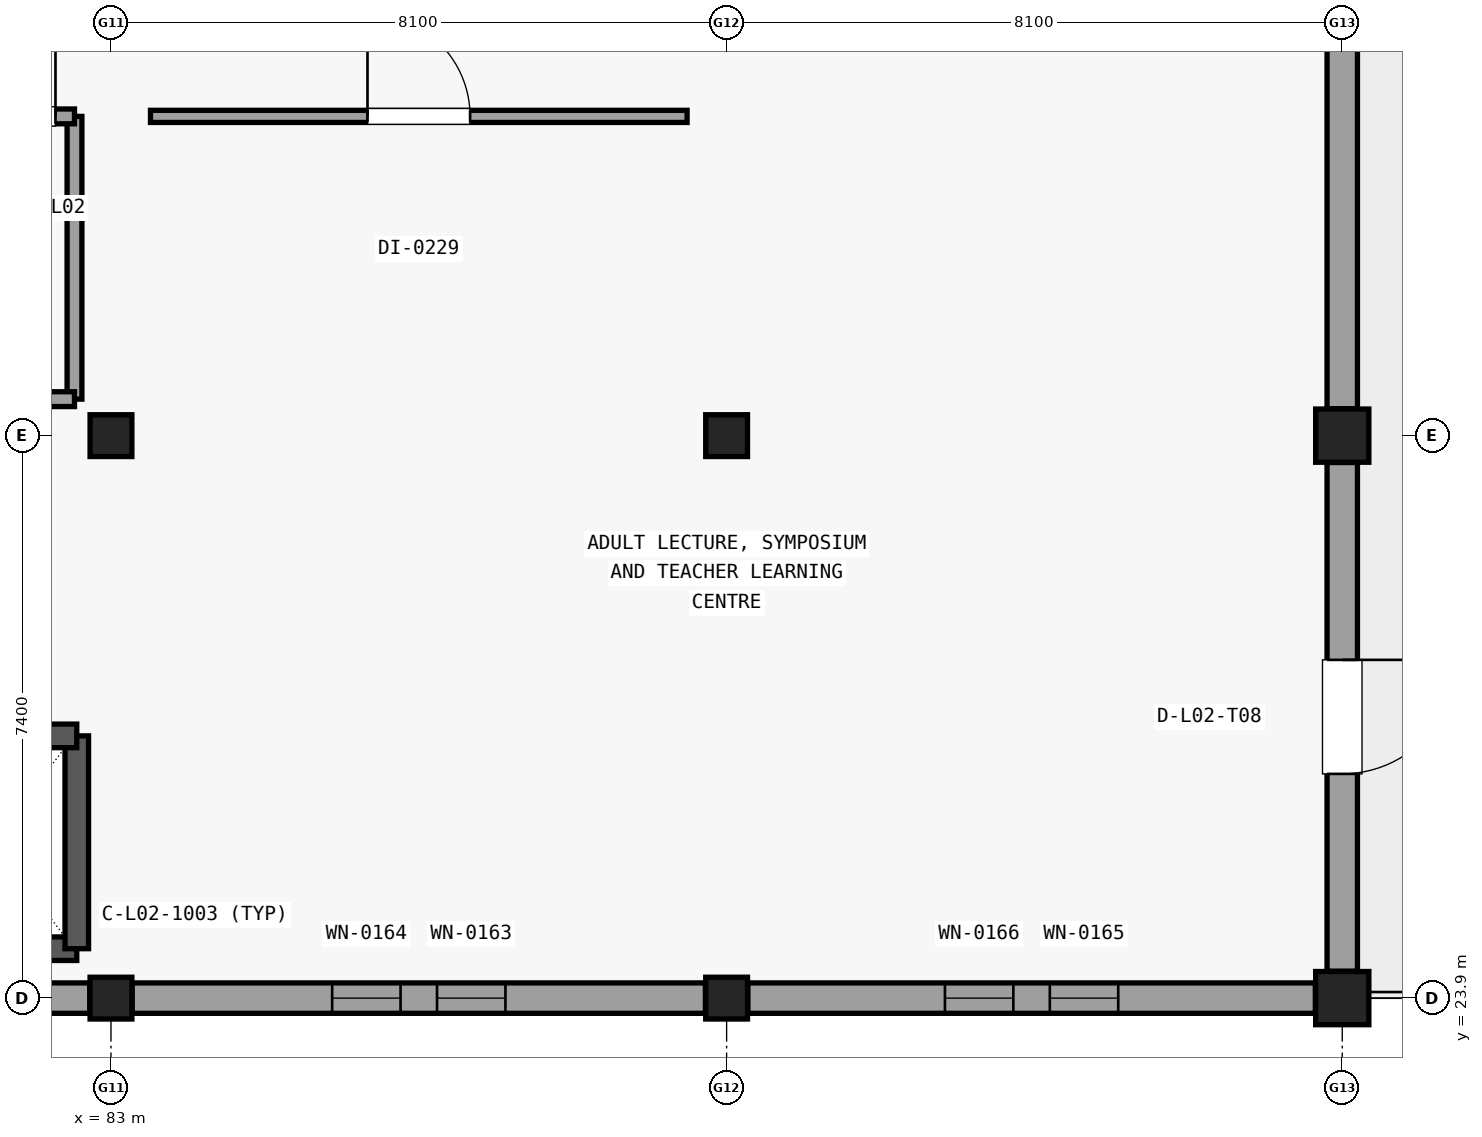
"""IFC4 building model, lengths in metres.
Left out: names, types, materials, properties, quantities, classifications, styles, units other than length and angle.
Written with IfcOpenShell. Run it as: python <this file> out.ifc"""

import sys

from ifc_helpers import new_model, si_unit, direction, frame, frame_2d, origin, origin_2d, place, context, subcontext, project, spatial, rectangle, extrude, element, fill, save


model = new_model("IFC4")
c1 = context("Model", 3, precision=1e-05, world=origin(), true_north=direction((0.0, 1.0)))
c2 = subcontext(c1, "Body", "Model", "MODEL_VIEW")
j1 = project(units=[si_unit("LENGTHUNIT", "METRE"), si_unit("PLANEANGLEUNIT", "RADIAN")], contexts=[c1])
p1 = place(None, origin())
s1 = spatial("IfcSite", under=j1, at=p1, CompositionType="ELEMENT")
p2 = place(p1, origin())
s2 = spatial("IfcBuilding", under=s1, at=p2, CompositionType="ELEMENT")
p3 = place(p2, frame((0.0, 0.0, 10.2)))
s3 = spatial("IfcBuildingStorey", under=s2, at=p3, CompositionType="ELEMENT", Elevation=10.2)
for number, where, z_axis, x_axis in (
    (1, (83.0, 23.9, 0.0), (0.0, 0.0, 1.0), (1.0, 0.0, 0.0)),
    (2, (83.0, 31.3, 0.0), (0.0, 0.0, 1.0), (1.0, 0.0, 0.0)),
    (3, (91.1, 23.9, 0.0), (0.0, 0.0, 1.0), (1.0, 0.0, 0.0)),
    (4, (91.1, 31.3, 0.0), (0.0, 0.0, 1.0), (1.0, 0.0, 0.0)),
):
    element("IfcColumn", number, at=place(p3, frame(where, z_axis=z_axis, x_axis=x_axis)), inside=s3, PredefinedType="COLUMN", context=c2, shape_type="SweptSolid", body=[
        extrude(rectangle(XDim=0.55, YDim=0.55, at=origin_2d()), origin(), (0.0, 0.0, 1.0), 3.37),
    ])
for number, where, z_axis, x_axis in (
    (5, (99.2, 23.9, 0.0), (0.0, 0.0, 1.0), (1.0, 0.0, 0.0)),
    (6, (99.2, 31.3, 0.0), (0.0, 0.0, 1.0), (1.0, 0.0, 0.0)),
):
    element("IfcColumn", number, at=place(p3, frame(where, z_axis=z_axis, x_axis=x_axis)), inside=s3, PredefinedType="COLUMN", context=c2, shape_type="SweptSolid", body=[
        extrude(rectangle(XDim=0.7, YDim=0.7, at=origin_2d()), origin(), (0.0, 0.0, 1.0), 3.37),
    ])
p4 = place(p3, frame((82.721, 23.9, 0.0), z_axis=(0.0, 0.0, 1.0), x_axis=(-1.0, 0.0, 0.0)))
e7 = element("IfcWall", 7, at=p4, inside=s3, PredefinedType="SOLIDWALL", context=c2, shape_type="SweptSolid", body=[
    extrude(rectangle(XDim=7.467, YDim=0.4, at=frame_2d((3.733, 0.0))), origin(), (0.0, 0.0, 1.0), 2.822),
])
p5 = place(p4, frame((2.594, 0.0, 0.6)))
e8 = element("IfcOpeningElement", 8, at=p5, cuts=e7, PredefinedType="OPENING", context=c2, shape_type="SweptSolid", body=[
    extrude(rectangle(XDim=0.9, YDim=1.98, at=frame_2d((0.45, 0.99))), frame((0.0, 0.21, 0.0), z_axis=(0.0, -1.0, 0.0), x_axis=(1.0, 0.0, 0.0)), (0.0, 0.0, 1.0), 0.42),
])
p6 = place(p4, frame((3.973, 0.0, 0.6)))
e9 = element("IfcOpeningElement", 9, at=p6, cuts=e7, PredefinedType="OPENING", context=c2, shape_type="SweptSolid", body=[
    extrude(rectangle(XDim=0.9, YDim=1.98, at=frame_2d((0.45, 0.99))), frame((0.0, 0.21, 0.0), z_axis=(0.0, -1.0, 0.0), x_axis=(1.0, 0.0, 0.0)), (0.0, 0.0, 1.0), 0.42),
])
p7 = place(p3, frame((90.821, 23.9, 0.0), z_axis=(0.0, 0.0, 1.0), x_axis=(-1.0, 0.0, 0.0)))
e10 = element("IfcWall", 10, at=p7, inside=s3, PredefinedType="SOLIDWALL", context=c2, shape_type="SweptSolid", body=[
    extrude(rectangle(XDim=7.542, YDim=0.4, at=frame_2d((3.771, 0.0))), origin(), (0.0, 0.0, 1.0), 2.898),
])
p8 = place(p7, frame((2.631, 0.0, 0.6)))
e11 = element("IfcOpeningElement", 11, at=p8, cuts=e10, PredefinedType="OPENING", context=c2, shape_type="SweptSolid", body=[
    extrude(rectangle(XDim=0.9, YDim=1.98, at=frame_2d((0.45, 0.99))), frame((0.0, 0.21, 0.0), z_axis=(0.0, -1.0, 0.0), x_axis=(1.0, 0.0, 0.0)), (0.0, 0.0, 1.0), 0.42),
])
p9 = place(p7, frame((4.011, 0.0, 0.6)))
e12 = element("IfcOpeningElement", 12, at=p9, cuts=e10, PredefinedType="OPENING", context=c2, shape_type="SweptSolid", body=[
    extrude(rectangle(XDim=0.9, YDim=1.98, at=frame_2d((0.45, 0.99))), frame((0.0, 0.21, 0.0), z_axis=(0.0, -1.0, 0.0), x_axis=(1.0, 0.0, 0.0)), (0.0, 0.0, 1.0), 0.42),
])
p10 = place(p3, frame((98.846, 23.9, 0.0), z_axis=(0.0, 0.0, 1.0), x_axis=(-1.0, 0.0, 0.0)))
e13 = element("IfcWall", 13, at=p10, inside=s3, PredefinedType="SOLIDWALL", context=c2, shape_type="SweptSolid", body=[
    extrude(rectangle(XDim=7.467, YDim=0.4, at=frame_2d((3.733, 0.0))), origin(), (0.0, 0.0, 1.0), 2.822),
])
p11 = place(p10, frame((2.594, 0.0, 0.6)))
e14 = element("IfcOpeningElement", 14, at=p11, cuts=e13, PredefinedType="OPENING", context=c2, shape_type="SweptSolid", body=[
    extrude(rectangle(XDim=0.9, YDim=1.98, at=frame_2d((0.45, 0.99))), frame((0.0, 0.21, 0.0), z_axis=(0.0, -1.0, 0.0), x_axis=(1.0, 0.0, 0.0)), (0.0, 0.0, 1.0), 0.42),
])
p12 = place(p10, frame((3.973, 0.0, 0.6)))
e15 = element("IfcOpeningElement", 15, at=p12, cuts=e13, PredefinedType="OPENING", context=c2, shape_type="SweptSolid", body=[
    extrude(rectangle(XDim=0.9, YDim=1.98, at=frame_2d((0.45, 0.99))), frame((0.0, 0.21, 0.0), z_axis=(0.0, -1.0, 0.0), x_axis=(1.0, 0.0, 0.0)), (0.0, 0.0, 1.0), 0.42),
])
p13 = place(p3, frame((99.2, 30.946, 0.0), z_axis=(0.0, 0.0, 1.0), x_axis=(0.0, -1.0, 0.0)))
e16 = element("IfcWall", 16, at=p13, inside=s3, PredefinedType="SOLIDWALL", context=c2, shape_type="SweptSolid", body=[
    extrude(rectangle(XDim=6.692, YDim=0.4, at=frame_2d((3.346, 0.0))), origin(), (0.0, 0.0, 1.0), 2.822),
])
p14 = place(p13, frame((2.596, 0.0, 0.0)))
e17 = element("IfcOpeningElement", 17, at=p14, cuts=e16, PredefinedType="OPENING", context=c2, shape_type="SweptSolid", body=[
    extrude(rectangle(XDim=1.5, YDim=2.1, at=frame_2d((0.75, 1.05))), frame((0.0, 0.21, 0.0), z_axis=(0.0, -1.0, 0.0), x_axis=(1.0, 0.0, 0.0)), (0.0, 0.0, 1.0), 0.42),
])
p15 = place(p3, frame((99.2, 38.346, 0.0), z_axis=(0.0, 0.0, 1.0), x_axis=(0.0, -1.0, 0.0)))
e18 = element("IfcWall", 18, at=p15, inside=s3, PredefinedType="SOLIDWALL", context=c2, shape_type="SweptSolid", body=[
    extrude(rectangle(XDim=6.692, YDim=0.4, at=frame_2d((3.346, 0.0))), origin(), (0.0, 0.0, 1.0), 2.509),
])
p16 = place(p3, frame((80.35, 24.55, 0.0), z_axis=(0.0, 0.0, 1.0), x_axis=(1.0, 0.0, 0.0)))
e19 = element("IfcWall", 19, at=p16, inside=s3, PredefinedType="SHEAR", context=c2, shape_type="SweptSolid", body=[
    extrude(rectangle(XDim=2.2, YDim=0.31, at=frame_2d((1.1, 0.0))), origin(), (0.0, 0.0, 1.0), 3.365),
])
p17 = place(p3, frame((82.55, 24.55, 0.0), z_axis=(0.0, 0.0, 1.0), x_axis=(0.0, 1.0, 0.0)))
e20 = element("IfcWall", 20, at=p17, inside=s3, PredefinedType="SHEAR", context=c2, shape_type="SweptSolid", body=[
    extrude(rectangle(XDim=2.8, YDim=0.31, at=frame_2d((1.4, 0.0))), origin(), (0.0, 0.0, 1.0), 3.365),
])
p18 = place(p3, frame((80.35, 27.35, 0.0), z_axis=(0.0, 0.0, 1.0), x_axis=(1.0, 0.0, 0.0)))
e21 = element("IfcWall", 21, at=p18, inside=s3, PredefinedType="SHEAR", context=c2, shape_type="SweptSolid", body=[
    extrude(rectangle(XDim=2.2, YDim=0.31, at=frame_2d((1.1, 0.0))), origin(), (0.0, 0.0, 1.0), 3.365),
])
p19 = place(p18, frame((0.5, 0.0, 0.0)))
e22 = element("IfcOpeningElement", 22, at=p19, cuts=e21, PredefinedType="OPENING", context=c2, shape_type="SweptSolid", body=[
    extrude(rectangle(XDim=1.2, YDim=2.15, at=frame_2d((0.6, 1.075))), frame((0.0, 0.165, 0.0), z_axis=(0.0, -1.0, 0.0), x_axis=(1.0, 0.0, 0.0)), (0.0, 0.0, 1.0), 0.33),
])
p20 = place(p3, frame((82.52, 31.78, 0.0), z_axis=(0.0, 0.0, 1.0), x_axis=(0.0, 1.0, 0.0)))
e23 = element("IfcWall", 23, at=p20, inside=s3, PredefinedType="PARTITIONING", context=c2, shape_type="SweptSolid", body=[
    extrude(rectangle(XDim=3.72, YDim=0.195, at=frame_2d((1.86, 0.0))), origin(), (0.0, 0.0, 1.0), 2.903),
])
p21 = place(p3, frame((79.55, 31.78, 0.0), z_axis=(0.0, 0.0, 1.0), x_axis=(1.0, 0.0, 0.0)))
e24 = element("IfcWall", 24, at=p21, inside=s3, PredefinedType="PARTITIONING", context=c2, shape_type="SweptSolid", body=[
    extrude(rectangle(XDim=2.97, YDim=0.195, at=frame_2d((1.485, 0.0))), origin(), (0.0, 0.0, 1.0), 2.903),
])
p22 = place(p3, frame((79.55, 35.5, 0.0), z_axis=(0.0, 0.0, 1.0), x_axis=(1.0, 0.0, 0.0)))
e25 = element("IfcWall", 25, at=p22, inside=s3, PredefinedType="PARTITIONING", context=c2, shape_type="SweptSolid", body=[
    extrude(rectangle(XDim=2.97, YDim=0.195, at=frame_2d((1.485, 0.0))), origin(), (0.0, 0.0, 1.0), 3.355),
])
p23 = place(p22, frame((0.25, 0.0, 0.0)))
e26 = element("IfcOpeningElement", 26, at=p23, cuts=e25, PredefinedType="OPENING", context=c2, shape_type="SweptSolid", body=[
    extrude(rectangle(XDim=0.95, YDim=2.1, at=frame_2d((0.475, 1.05))), frame((0.0, 0.107, 0.0), z_axis=(0.0, -1.0, 0.0), x_axis=(1.0, 0.0, 0.0)), (0.0, 0.0, 1.0), 0.215),
])
p24 = place(p22, frame((1.82, 0.0, 0.0)))
e27 = element("IfcOpeningElement", 27, at=p24, cuts=e25, PredefinedType="OPENING", context=c2, shape_type="SweptSolid", body=[
    extrude(rectangle(XDim=0.9, YDim=2.1, at=frame_2d((0.45, 1.05))), frame((0.0, 0.107, 0.0), z_axis=(0.0, -1.0, 0.0), x_axis=(1.0, 0.0, 0.0)), (0.0, 0.0, 1.0), 0.215),
])
p25 = place(p3, frame((83.52, 35.5, 0.0), z_axis=(0.0, 0.0, 1.0), x_axis=(1.0, 0.0, 0.0)))
e28 = element("IfcWall", 28, at=p25, inside=s3, PredefinedType="PARTITIONING", context=c2, shape_type="SweptSolid", body=[
    extrude(rectangle(XDim=7.06, YDim=0.16, at=frame_2d((3.53, 0.0))), origin(), (0.0, 0.0, 1.0), 3.355),
])
p26 = place(p25, frame((2.855, 0.0, 0.0)))
e29 = element("IfcOpeningElement", 29, at=p26, cuts=e28, PredefinedType="OPENING", context=c2, shape_type="SweptSolid", body=[
    extrude(rectangle(XDim=1.35, YDim=2.2, at=frame_2d((0.675, 1.1))), frame((0.0, 0.09, 0.0), z_axis=(0.0, -1.0, 0.0), x_axis=(1.0, 0.0, 0.0)), (0.0, 0.0, 1.0), 0.18),
])
p27 = place(p8, origin())
e30 = element("IfcWindow", 30, at=p27, inside=s3, PartitioningType="SINGLE_PANEL", PredefinedType="WINDOW", context=c2, shape_type="SweptSolid", body=[
    extrude(rectangle(XDim=0.9, YDim=1.98, at=frame_2d((0.45, 0.99))), frame((0.0, 0.03, 0.0), z_axis=(0.0, -1.0, 0.0), x_axis=(1.0, 0.0, 0.0)), (0.0, 0.0, 1.0), 0.06),
])
fill(e11, e30)
p28 = place(p9, origin())
e31 = element("IfcWindow", 31, at=p28, inside=s3, PartitioningType="SINGLE_PANEL", PredefinedType="WINDOW", context=c2, shape_type="SweptSolid", body=[
    extrude(rectangle(XDim=0.9, YDim=1.98, at=frame_2d((0.45, 0.99))), frame((0.0, 0.03, 0.0), z_axis=(0.0, -1.0, 0.0), x_axis=(1.0, 0.0, 0.0)), (0.0, 0.0, 1.0), 0.06),
])
fill(e12, e31)
p29 = place(p11, origin())
e32 = element("IfcWindow", 32, at=p29, inside=s3, PartitioningType="SINGLE_PANEL", PredefinedType="WINDOW", context=c2, shape_type="SweptSolid", body=[
    extrude(rectangle(XDim=0.9, YDim=1.98, at=frame_2d((0.45, 0.99))), frame((0.0, 0.03, 0.0), z_axis=(0.0, -1.0, 0.0), x_axis=(1.0, 0.0, 0.0)), (0.0, 0.0, 1.0), 0.06),
])
fill(e14, e32)
p30 = place(p12, origin())
e33 = element("IfcWindow", 33, at=p30, inside=s3, PartitioningType="SINGLE_PANEL", PredefinedType="WINDOW", context=c2, shape_type="SweptSolid", body=[
    extrude(rectangle(XDim=0.9, YDim=1.98, at=frame_2d((0.45, 0.99))), frame((0.0, 0.03, 0.0), z_axis=(0.0, -1.0, 0.0), x_axis=(1.0, 0.0, 0.0)), (0.0, 0.0, 1.0), 0.06),
])
fill(e15, e33)
p31 = place(p14, origin())
e34 = element("IfcDoor", 34, at=p31, inside=s3, OperationType="SINGLE_SWING_LEFT", PredefinedType="DOOR", context=c2, shape_type="SweptSolid", body=[
    extrude(rectangle(XDim=1.5, YDim=2.1, at=frame_2d((0.75, 1.05))), frame((0.0, 0.025, 0.0), z_axis=(0.0, -1.0, 0.0), x_axis=(1.0, 0.0, 0.0)), (0.0, 0.0, 1.0), 0.05),
])
fill(e17, e34)
p32 = place(p24, origin())
e35 = element("IfcDoor", 35, at=p32, inside=s3, OperationType="SINGLE_SWING_RIGHT", PredefinedType="DOOR", context=c2, shape_type="SweptSolid", body=[
    extrude(rectangle(XDim=0.9, YDim=2.1, at=frame_2d((0.45, 1.05))), frame((0.0, 0.025, 0.0), z_axis=(0.0, -1.0, 0.0), x_axis=(1.0, 0.0, 0.0)), (0.0, 0.0, 1.0), 0.05),
])
fill(e27, e35)
p33 = place(p26, origin())
e36 = element("IfcDoor", 36, at=p33, inside=s3, OperationType="SINGLE_SWING_LEFT", PredefinedType="DOOR", context=c2, shape_type="SweptSolid", body=[
    extrude(rectangle(XDim=1.35, YDim=2.2, at=frame_2d((0.675, 1.1))), frame((0.0, 0.025, 0.0), z_axis=(0.0, -1.0, 0.0), x_axis=(1.0, 0.0, 0.0)), (0.0, 0.0, 1.0), 0.05),
])
fill(e29, e36)
save(model, sys.argv[1])
